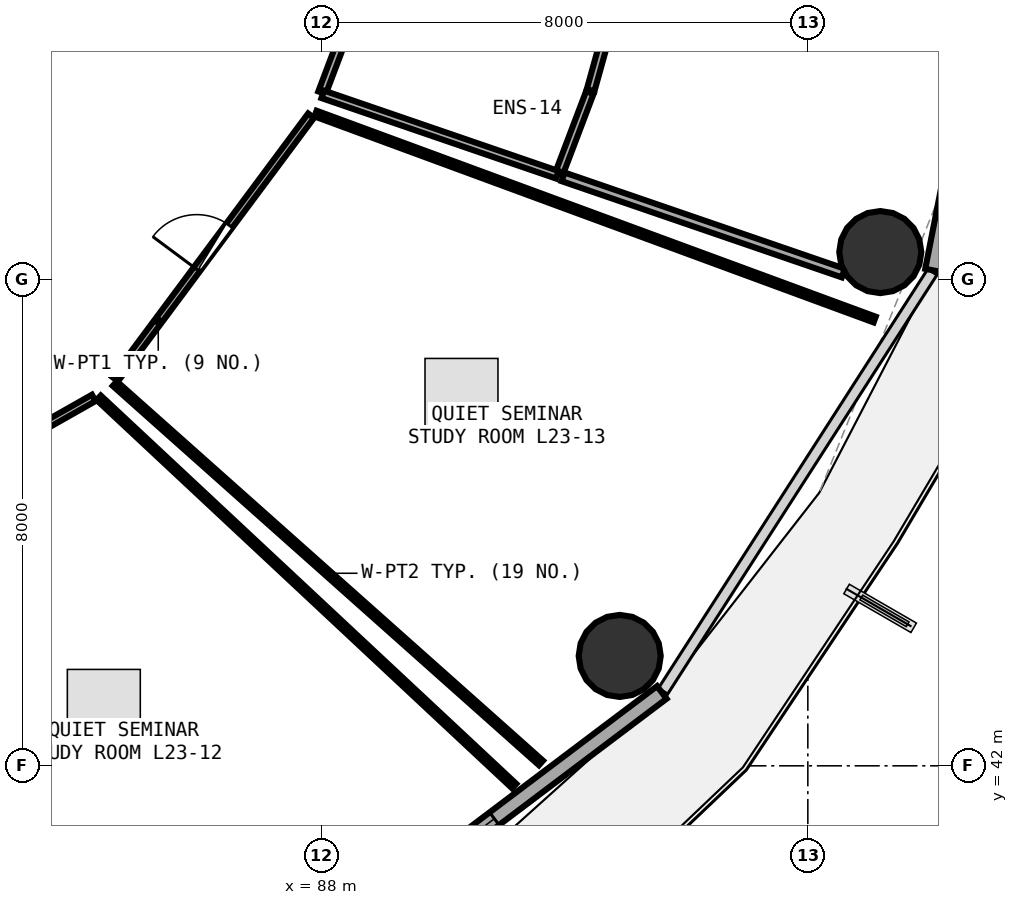
"""IFC4 building model, lengths in metres.
Left out: names, types, materials, properties, quantities, classifications, styles, units other than length and angle.
Written with IfcOpenShell. Run it as: python <this file> out.ifc"""

import sys

from ifc_helpers import new_model, si_unit, direction, frame, frame_2d, origin, origin_2d, place, context, subcontext, project, spatial, rectangle, circle, extrude, element, fill, save


model = new_model("IFC4")
c1 = context("Model", 3, precision=1e-05, world=origin(), true_north=direction((0.0, 1.0)))
c2 = subcontext(c1, "Body", "Model", "MODEL_VIEW")
j1 = project(units=[si_unit("LENGTHUNIT", "METRE"), si_unit("PLANEANGLEUNIT", "RADIAN")], contexts=[c1])
p1 = place(None, origin())
s1 = spatial("IfcSite", under=j1, at=p1, CompositionType="ELEMENT")
p2 = place(p1, origin())
s2 = spatial("IfcBuilding", under=s1, at=p2, CompositionType="ELEMENT")
p3 = place(p2, frame((0.0, 0.0, 91.35)))
s3 = spatial("IfcBuildingStorey", under=s2, at=p3, CompositionType="ELEMENT", Elevation=91.35)
for number, where, z_axis, x_axis in (
    (1, (92.906, 43.807, 0.0), (0.0, 0.0, 1.0), (1.0, 0.0, 0.0)),
    (2, (97.192, 50.448, 0.0), (0.0, 0.0, 1.0), (1.0, 0.0, 0.0)),
):
    element("IfcColumn", number, at=place(p3, frame(where, z_axis=z_axis, x_axis=x_axis)), inside=s3, PredefinedType="COLUMN", context=c2, shape_type="SweptSolid", body=[
        extrude(circle(Radius=0.675, at=origin_2d()), origin(), (0.0, 0.0, 1.0), 3.75),
    ])
p4 = place(p3, frame((86.812, 38.09, 0.0), z_axis=(0.0, 0.0, 1.0), x_axis=(0.798501507879, 0.601992808857, 0.0)))
e3 = element("IfcWall", 3, at=p4, inside=s3, PredefinedType="SOLIDWALL", context=c2, shape_type="SweptSolid", body=[
    extrude(rectangle(XDim=8.499, YDim=0.26, at=frame_2d((4.25, 0.0))), origin(), (0.0, 0.0, 1.0), 3.475),
])
p5 = place(p4, frame((3.45, 0.0, 0.85)))
e4 = element("IfcOpeningElement", 4, at=p5, cuts=e3, PredefinedType="OPENING", context=c2, shape_type="SweptSolid", body=[
    extrude(rectangle(XDim=1.6, YDim=1.45, at=frame_2d((0.8, 0.725))), frame((0.0, 0.14, 0.0), z_axis=(0.0, -1.0, 0.0), x_axis=(1.0, 0.0, 0.0)), (0.0, 0.0, 1.0), 0.28),
])
p6 = place(p3, frame((98.059, 50.148, 0.0), z_axis=(0.0, 0.0, 1.0), x_axis=(0.192581843632, 0.981280914674, 0.0)))
e5 = element("IfcWall", 5, at=p6, inside=s3, PredefinedType="SOLIDWALL", context=c2, shape_type="SweptSolid", body=[
    extrude(rectangle(XDim=7.987, YDim=0.26, at=frame_2d((3.993, 0.0))), origin(), (0.0, 0.0, 1.0), 3.475),
])
p7 = place(p6, frame((3.193, 0.0, 0.85)))
e6 = element("IfcOpeningElement", 6, at=p7, cuts=e5, PredefinedType="OPENING", context=c2, shape_type="SweptSolid", body=[
    extrude(rectangle(XDim=1.6, YDim=1.45, at=frame_2d((0.8, 0.725))), frame((0.0, 0.14, 0.0), z_axis=(0.0, -1.0, 0.0), x_axis=(1.0, 0.0, 0.0)), (0.0, 0.0, 1.0), 0.28),
])
p8 = place(p3, frame((79.365, 45.28, 0.0), z_axis=(0.0, 0.0, 1.0), x_axis=(0.870068136537, 0.49293147372, 0.0)))
e7 = element("IfcWall", 7, at=p8, inside=s3, PredefinedType="PARTITIONING", context=c2, shape_type="SweptSolid", body=[
    extrude(rectangle(XDim=5.621, YDim=0.12, at=frame_2d((2.811, 0.0))), origin(), (0.0, 0.0, 1.0), 2.925),
])
p9 = place(p8, frame((2.36, 0.0, 0.0)))
e8 = element("IfcOpeningElement", 8, at=p9, cuts=e7, PredefinedType="OPENING", context=c2, shape_type="SweptSolid", body=[
    extrude(rectangle(XDim=0.9, YDim=2.08, at=frame_2d((0.45, 1.04))), frame((0.0, 0.07, 0.0), z_axis=(0.0, -1.0, 0.0), x_axis=(1.0, 0.0, 0.0)), (0.0, 0.0, 1.0), 0.14),
])
p10 = place(p3, frame((84.608, 48.36, 0.0), z_axis=(0.0, 0.0, 1.0), x_axis=(0.596833425992, 0.802365167251, 0.0)))
e9 = element("IfcWall", 9, at=p10, inside=s3, PredefinedType="PARTITIONING", context=c2, shape_type="SweptSolid", body=[
    extrude(rectangle(XDim=5.399, YDim=0.12, at=frame_2d((2.699, 0.0))), origin(), (0.0, 0.0, 1.0), 2.925),
])
p11 = place(p10, frame((2.249, 0.0, 0.0)))
e10 = element("IfcOpeningElement", 10, at=p11, cuts=e9, PredefinedType="OPENING", context=c2, shape_type="SweptSolid", body=[
    extrude(rectangle(XDim=0.9, YDim=2.08, at=frame_2d((0.45, 1.04))), frame((0.0, 0.07, 0.0), z_axis=(0.0, -1.0, 0.0), x_axis=(1.0, 0.0, 0.0)), (0.0, 0.0, 1.0), 0.14),
])
p12 = place(p3, frame((84.337, 48.053, 0.0), z_axis=(0.0, 0.0, 1.0), x_axis=(0.730663657097, -0.682737592489, 0.0)))
e11 = element("IfcWall", 11, at=p12, inside=s3, PredefinedType="PARTITIONING", context=c2, shape_type="SweptSolid", body=[
    extrude(rectangle(XDim=9.353, YDim=0.1, at=frame_2d((4.676, 0.0))), origin(), (0.0, 0.0, 1.0), 2.975),
])
p13 = place(p3, frame((87.904, 52.726, 0.0), z_axis=(0.0, 0.0, 1.0), x_axis=(0.938361829853, -0.345654562063, 0.0)))
e12 = element("IfcWall", 12, at=p13, inside=s3, PredefinedType="PARTITIONING", context=c2, shape_type="SweptSolid", body=[
    extrude(rectangle(XDim=9.8, YDim=0.1, at=frame_2d((4.9, 0.0))), origin(), (0.0, 0.0, 1.0), 2.925),
])
p14 = place(p3, frame((91.611, 42.048, 0.0), z_axis=(0.0, 0.0, 1.0), x_axis=(-0.747021589751, 0.664799777713, 0.0)))
e13 = element("IfcWall", 13, at=p14, inside=s3, PredefinedType="PARTITIONING", context=c2, shape_type="SweptSolid", body=[
    extrude(rectangle(XDim=9.383, YDim=0.1, at=frame_2d((4.691, 0.0))), origin(), (0.0, 0.0, 1.0), 2.975),
])
p15 = place(p3, frame((88.01, 53.068, 0.0), z_axis=(0.0, 0.0, 1.0), x_axis=(0.353582849957, 0.93540321157, 0.0)))
e14 = element("IfcWall", 14, at=p15, inside=s3, PredefinedType="PLUMBINGWALL", context=c2, shape_type="SweptSolid", body=[
    extrude(rectangle(XDim=1.12, YDim=0.13, at=frame_2d((0.56, 0.0))), origin(), (0.0, 0.0, 1.0), 3.235),
])
p16 = place(p3, frame((92.81, 54.484, 0.0), z_axis=(0.0, 0.0, 1.0), x_axis=(-0.268041350083, -0.963407408445, 0.0)))
e15 = element("IfcWall", 15, at=p16, inside=s3, PredefinedType="PLUMBINGWALL", context=c2, shape_type="SweptSolid", body=[
    extrude(rectangle(XDim=1.426, YDim=0.13, at=frame_2d((0.713, 0.0))), origin(), (0.0, 0.0, 1.0), 3.48),
])
p17 = place(p3, frame((92.415, 53.072, 0.0), z_axis=(0.0, 0.0, 1.0), x_axis=(-0.354833873896, -0.934929367351, 0.0)))
e16 = element("IfcWall", 16, at=p17, inside=s3, PredefinedType="PLUMBINGWALL", context=c2, shape_type="SweptSolid", body=[
    extrude(rectangle(XDim=1.434, YDim=0.13, at=frame_2d((0.717, 0.0))), origin(), (0.0, 0.0, 1.0), 3.48),
])
p18 = place(p3, frame((91.88, 51.719, 0.0), z_axis=(0.0, 0.0, 1.0), x_axis=(-0.945930729077, 0.324368703466, 0.0)))
e17 = element("IfcWall", 17, at=p18, inside=s3, PredefinedType="PLUMBINGWALL", context=c2, shape_type="SweptSolid", body=[
    extrude(rectangle(XDim=4.079, YDim=0.13, at=frame_2d((2.039, 0.0))), origin(), (0.0, 0.0, 1.0), 3.175),
])
p19 = place(p3, frame((96.583, 50.104, 0.0), z_axis=(0.0, 0.0, 1.0), x_axis=(-0.945793886269, 0.324767493288, 0.0)))
e18 = element("IfcWall", 18, at=p19, inside=s3, PredefinedType="PARTITIONING", context=c2, shape_type="SweptSolid", body=[
    extrude(rectangle(XDim=4.873, YDim=0.15, at=frame_2d((2.437, 0.0))), origin(), (0.0, 0.0, 1.0), 2.925),
])
p20 = place(p5, origin())
e19 = element("IfcWindow", 19, at=p20, inside=s3, PartitioningType="SINGLE_PANEL", PredefinedType="WINDOW", context=c2, shape_type="SweptSolid", body=[
    extrude(rectangle(XDim=1.6, YDim=1.45, at=frame_2d((0.8, 0.725))), frame((0.0, 0.03, 0.0), z_axis=(0.0, -1.0, 0.0), x_axis=(1.0, 0.0, 0.0)), (0.0, 0.0, 1.0), 0.06),
])
fill(e4, e19)
p21 = place(p11, origin())
e20 = element("IfcDoor", 20, at=p21, inside=s3, OperationType="SINGLE_SWING_LEFT", PredefinedType="DOOR", context=c2, shape_type="SweptSolid", body=[
    extrude(rectangle(XDim=0.9, YDim=2.08, at=frame_2d((0.45, 1.04))), frame((0.0, 0.025, 0.0), z_axis=(0.0, -1.0, 0.0), x_axis=(1.0, 0.0, 0.0)), (0.0, 0.0, 1.0), 0.05),
])
fill(e10, e20)
save(model, sys.argv[1])
